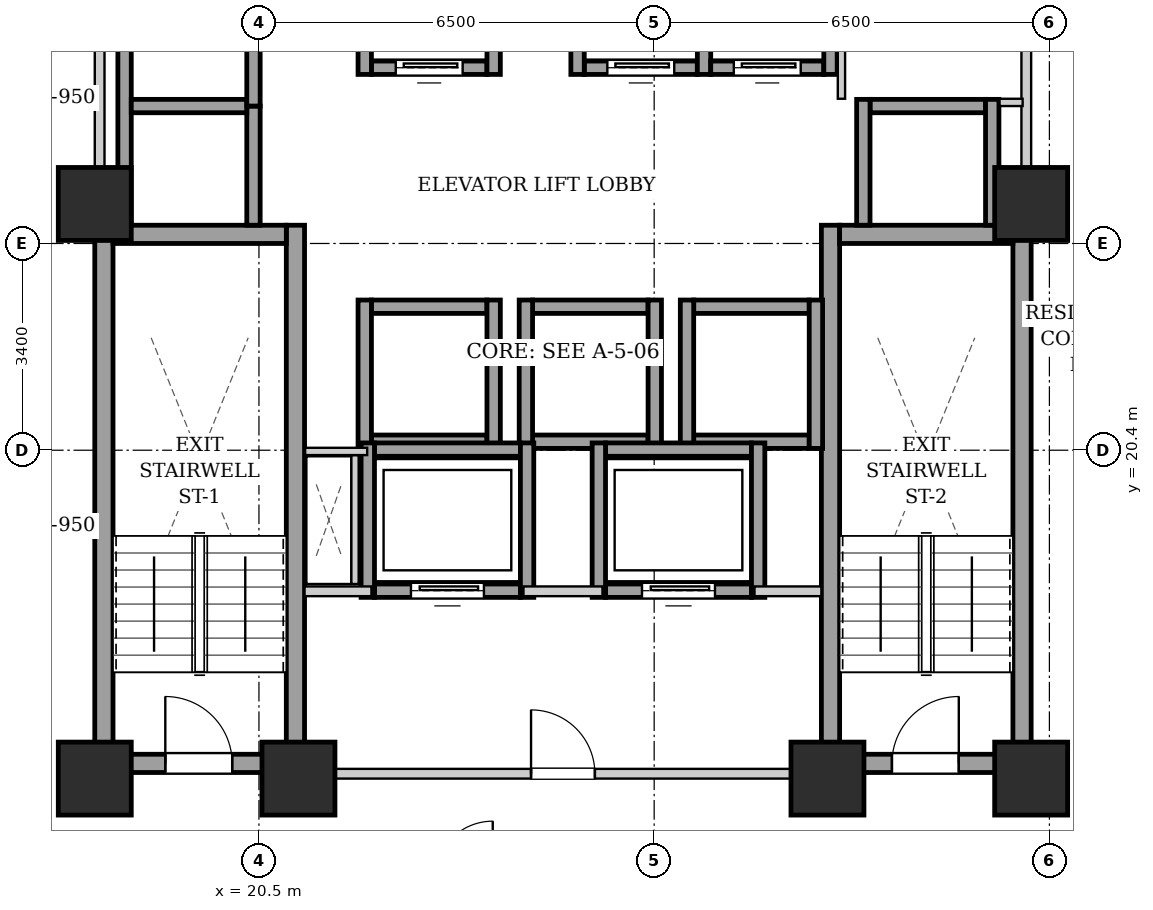
"""IFC4 building model, lengths in metres.
Left out: names, types, materials, properties, quantities, classifications, styles, units other than length and angle.
Written with IfcOpenShell. Run it as: python <this file> out.ifc"""

import sys

from ifc_helpers import new_model, si_unit, direction, frame, frame_2d, origin, origin_2d, place, context, subcontext, project, spatial, rectangle, extrude, element, fill, save


model = new_model("IFC4")
c1 = context("Model", 3, precision=1e-05, world=origin(), true_north=direction((0.0, 1.0)))
c2 = subcontext(c1, "Body", "Model", "MODEL_VIEW")
j1 = project(units=[si_unit("LENGTHUNIT", "METRE"), si_unit("PLANEANGLEUNIT", "RADIAN")], contexts=[c1])
p1 = place(None, origin())
s1 = spatial("IfcSite", under=j1, at=p1, CompositionType="ELEMENT")
p2 = place(p1, origin())
s2 = spatial("IfcBuilding", under=s1, at=p2, CompositionType="ELEMENT")
p3 = place(p2, frame((0.0, 0.0, 38.6)))
s3 = spatial("IfcBuildingStorey", under=s2, at=p3, CompositionType="ELEMENT", Elevation=38.6)
for number, where, z_axis, x_axis in (
    (1, (17.8, 15.0, 0.0), (0.0, 0.0, 1.0), (1.0, 0.0, 0.0)),
    (2, (21.15, 15.0, 0.0), (0.0, 0.0, 1.0), (1.0, 0.0, 0.0)),
    (3, (29.85, 15.0, 0.0), (0.0, 0.0, 1.0), (1.0, 0.0, 0.0)),
    (4, (33.2, 15.0, 0.0), (0.0, 0.0, 1.0), (1.0, 0.0, 0.0)),
    (5, (17.8, 24.45, 0.0), (0.0, 0.0, 1.0), (1.0, 0.0, 0.0)),
    (6, (33.2, 24.45, 0.0), (0.0, 0.0, 1.0), (1.0, 0.0, 0.0)),
):
    element("IfcColumn", number, at=place(p3, frame(where, z_axis=z_axis, x_axis=x_axis)), inside=s3, PredefinedType="COLUMN", context=c2, shape_type="SweptSolid", body=[
        extrude(rectangle(XDim=1.2, YDim=1.2, at=origin_2d()), origin(), (0.0, 0.0, 1.0), 3.2),
    ])
for number, where, z_axis, x_axis in (
    (7, (17.95, 15.1, 0.0), (0.0, 0.0, 1.0), (0.0, 1.0, 0.0)),
    (8, (21.1, 15.1, 0.0), (0.0, 0.0, 1.0), (0.0, 1.0, 0.0)),
):
    element("IfcWall", number, at=place(p3, frame(where, z_axis=z_axis, x_axis=x_axis)), inside=s3, PredefinedType="SHEAR", context=c2, shape_type="SweptSolid", body=[
        extrude(rectangle(XDim=9.0, YDim=0.3, at=frame_2d((4.5, 0.0))), origin(), (0.0, 0.0, 1.0), 2.94),
    ])
p4 = place(p3, frame((18.1, 23.95, 0.0), z_axis=(0.0, 0.0, 1.0), x_axis=(1.0, 0.0, 0.0)))
e9 = element("IfcWall", 9, at=p4, inside=s3, PredefinedType="SHEAR", context=c2, shape_type="SweptSolid", body=[
    extrude(rectangle(XDim=2.85, YDim=0.3, at=frame_2d((1.425, 0.0))), origin(), (0.0, 0.0, 1.0), 2.94),
])
p5 = place(p3, frame((18.1, 15.25, 0.0), z_axis=(0.0, 0.0, 1.0), x_axis=(1.0, 0.0, 0.0)))
e10 = element("IfcWall", 10, at=p5, inside=s3, PredefinedType="SHEAR", context=c2, shape_type="SweptSolid", body=[
    extrude(rectangle(XDim=2.85, YDim=0.3, at=frame_2d((1.425, 0.0))), origin(), (0.0, 0.0, 1.0), 2.94),
])
p6 = place(p5, frame((0.86, 0.0, 0.0)))
e11 = element("IfcOpeningElement", 11, at=p6, cuts=e10, PredefinedType="OPENING", context=c2, shape_type="SweptSolid", body=[
    extrude(rectangle(XDim=1.1, YDim=2.05, at=frame_2d((0.55, 1.025))), frame((0.0, 0.16, 0.0), z_axis=(0.0, -1.0, 0.0), x_axis=(1.0, 0.0, 0.0)), (0.0, 0.0, 1.0), 0.32),
])
for number, where, z_axis, x_axis in (
    (12, (29.9, 15.1, 0.0), (0.0, 0.0, 1.0), (0.0, 1.0, 0.0)),
    (13, (33.05, 15.1, 0.0), (0.0, 0.0, 1.0), (0.0, 1.0, 0.0)),
):
    element("IfcWall", number, at=place(p3, frame(where, z_axis=z_axis, x_axis=x_axis)), inside=s3, PredefinedType="SHEAR", context=c2, shape_type="SweptSolid", body=[
        extrude(rectangle(XDim=9.0, YDim=0.3, at=frame_2d((4.5, 0.0))), origin(), (0.0, 0.0, 1.0), 2.94),
    ])
p7 = place(p3, frame((30.05, 23.95, 0.0), z_axis=(0.0, 0.0, 1.0), x_axis=(1.0, 0.0, 0.0)))
e14 = element("IfcWall", 14, at=p7, inside=s3, PredefinedType="SHEAR", context=c2, shape_type="SweptSolid", body=[
    extrude(rectangle(XDim=2.85, YDim=0.3, at=frame_2d((1.425, 0.0))), origin(), (0.0, 0.0, 1.0), 2.94),
])
p8 = place(p3, frame((30.05, 15.25, 0.0), z_axis=(0.0, 0.0, 1.0), x_axis=(1.0, 0.0, 0.0)))
e15 = element("IfcWall", 15, at=p8, inside=s3, PredefinedType="SHEAR", context=c2, shape_type="SweptSolid", body=[
    extrude(rectangle(XDim=2.85, YDim=0.3, at=frame_2d((1.425, 0.0))), origin(), (0.0, 0.0, 1.0), 2.94),
])
p9 = place(p8, frame((0.86, 0.0, 0.0)))
e16 = element("IfcOpeningElement", 16, at=p9, cuts=e15, PredefinedType="OPENING", context=c2, shape_type="SweptSolid", body=[
    extrude(rectangle(XDim=1.1, YDim=2.05, at=frame_2d((0.55, 1.025))), frame((0.0, 0.16, 0.0), z_axis=(0.0, -1.0, 0.0), x_axis=(1.0, 0.0, 0.0)), (0.0, 0.0, 1.0), 0.32),
])
p10 = place(p3, frame((22.35, 26.69, 0.0), z_axis=(0.0, 0.0, 1.0), x_axis=(1.0, 0.0, 0.0)))
e17 = element("IfcWall", 17, at=p10, inside=s3, PredefinedType="SHEAR", context=c2, shape_type="SweptSolid", body=[
    extrude(rectangle(XDim=1.9, YDim=0.22, at=frame_2d((0.95, 0.0))), origin(), (0.0, 0.0, 1.0), 2.94),
])
p11 = place(p10, frame((0.4, 0.0, 0.0)))
e18 = element("IfcOpeningElement", 18, at=p11, cuts=e17, PredefinedType="OPENING", context=c2, shape_type="SweptSolid", body=[
    extrude(rectangle(XDim=1.1, YDim=2.15, at=frame_2d((0.55, 1.075))), frame((0.0, 0.12, 0.0), z_axis=(0.0, -1.0, 0.0), x_axis=(1.0, 0.0, 0.0)), (0.0, 0.0, 1.0), 0.24),
])
for number, where, z_axis, x_axis in (
    (19, (22.24, 26.58, 0.0), (0.0, 0.0, 1.0), (0.0, 1.0, 0.0)),
    (20, (24.36, 26.58, 0.0), (0.0, 0.0, 1.0), (0.0, 1.0, 0.0)),
):
    element("IfcWall", number, at=place(p3, frame(where, z_axis=z_axis, x_axis=x_axis)), inside=s3, PredefinedType="SHEAR", context=c2, shape_type="SweptSolid", body=[
        extrude(rectangle(XDim=2.44, YDim=0.22, at=frame_2d((1.22, 0.0))), origin(), (0.0, 0.0, 1.0), 2.94),
    ])
p12 = place(p3, frame((25.85, 26.69, 0.0), z_axis=(0.0, 0.0, 1.0), x_axis=(1.0, 0.0, 0.0)))
e21 = element("IfcWall", 21, at=p12, inside=s3, PredefinedType="SHEAR", context=c2, shape_type="SweptSolid", body=[
    extrude(rectangle(XDim=1.86, YDim=0.22, at=frame_2d((0.93, 0.0))), origin(), (0.0, 0.0, 1.0), 2.94),
])
p13 = place(p12, frame((0.38, 0.0, 0.0)))
e22 = element("IfcOpeningElement", 22, at=p13, cuts=e21, PredefinedType="OPENING", context=c2, shape_type="SweptSolid", body=[
    extrude(rectangle(XDim=1.1, YDim=2.15, at=frame_2d((0.55, 1.075))), frame((0.0, 0.12, 0.0), z_axis=(0.0, -1.0, 0.0), x_axis=(1.0, 0.0, 0.0)), (0.0, 0.0, 1.0), 0.24),
])
for number, where, z_axis, x_axis in (
    (23, (25.74, 26.58, 0.0), (0.0, 0.0, 1.0), (0.0, 1.0, 0.0)),
    (24, (27.82, 26.58, 0.0), (0.0, 0.0, 1.0), (0.0, 1.0, 0.0)),
):
    element("IfcWall", number, at=place(p3, frame(where, z_axis=z_axis, x_axis=x_axis)), inside=s3, PredefinedType="SHEAR", context=c2, shape_type="SweptSolid", body=[
        extrude(rectangle(XDim=2.44, YDim=0.22, at=frame_2d((1.22, 0.0))), origin(), (0.0, 0.0, 1.0), 2.94),
    ])
p14 = place(p3, frame((27.93, 26.69, 0.0), z_axis=(0.0, 0.0, 1.0), x_axis=(1.0, 0.0, 0.0)))
e25 = element("IfcWall", 25, at=p14, inside=s3, PredefinedType="SHEAR", context=c2, shape_type="SweptSolid", body=[
    extrude(rectangle(XDim=1.86, YDim=0.22, at=frame_2d((0.93, 0.0))), origin(), (0.0, 0.0, 1.0), 2.94),
])
p15 = place(p14, frame((0.38, 0.0, 0.0)))
e26 = element("IfcOpeningElement", 26, at=p15, cuts=e25, PredefinedType="OPENING", context=c2, shape_type="SweptSolid", body=[
    extrude(rectangle(XDim=1.1, YDim=2.15, at=frame_2d((0.55, 1.075))), frame((0.0, 0.12, 0.0), z_axis=(0.0, -1.0, 0.0), x_axis=(1.0, 0.0, 0.0)), (0.0, 0.0, 1.0), 0.24),
])
p16 = place(p3, frame((29.9, 26.58, 0.0), z_axis=(0.0, 0.0, 1.0), x_axis=(0.0, 1.0, 0.0)))
e27 = element("IfcWall", 27, at=p16, inside=s3, PredefinedType="SHEAR", context=c2, shape_type="SweptSolid", body=[
    extrude(rectangle(XDim=2.44, YDim=0.22, at=frame_2d((1.22, 0.0))), origin(), (0.0, 0.0, 1.0), 2.94),
])
for number, where, z_axis, x_axis in (
    (28, (22.35, 20.54, 0.0), (0.0, 0.0, 1.0), (1.0, 0.0, 0.0)),
    (29, (22.35, 22.76, 0.0), (0.0, 0.0, 1.0), (1.0, 0.0, 0.0)),
):
    element("IfcWall", number, at=place(p3, frame(where, z_axis=z_axis, x_axis=x_axis)), inside=s3, PredefinedType="SHEAR", context=c2, shape_type="SweptSolid", body=[
        extrude(rectangle(XDim=1.9, YDim=0.22, at=frame_2d((0.95, 0.0))), origin(), (0.0, 0.0, 1.0), 2.94),
    ])
for number, where, z_axis, x_axis in (
    (30, (22.24, 20.43, 0.0), (0.0, 0.0, 1.0), (0.0, 1.0, 0.0)),
    (31, (24.36, 20.43, 0.0), (0.0, 0.0, 1.0), (0.0, 1.0, 0.0)),
):
    element("IfcWall", number, at=place(p3, frame(where, z_axis=z_axis, x_axis=x_axis)), inside=s3, PredefinedType="SHEAR", context=c2, shape_type="SweptSolid", body=[
        extrude(rectangle(XDim=2.44, YDim=0.22, at=frame_2d((1.22, 0.0))), origin(), (0.0, 0.0, 1.0), 2.94),
    ])
for number, where, z_axis, x_axis in (
    (32, (25.0, 20.54, 0.0), (0.0, 0.0, 1.0), (1.0, 0.0, 0.0)),
    (33, (25.0, 22.76, 0.0), (0.0, 0.0, 1.0), (1.0, 0.0, 0.0)),
):
    element("IfcWall", number, at=place(p3, frame(where, z_axis=z_axis, x_axis=x_axis)), inside=s3, PredefinedType="SHEAR", context=c2, shape_type="SweptSolid", body=[
        extrude(rectangle(XDim=1.9, YDim=0.22, at=frame_2d((0.95, 0.0))), origin(), (0.0, 0.0, 1.0), 2.94),
    ])
for number, where, z_axis, x_axis in (
    (34, (24.89, 20.43, 0.0), (0.0, 0.0, 1.0), (0.0, 1.0, 0.0)),
    (35, (27.01, 20.43, 0.0), (0.0, 0.0, 1.0), (0.0, 1.0, 0.0)),
):
    element("IfcWall", number, at=place(p3, frame(where, z_axis=z_axis, x_axis=x_axis)), inside=s3, PredefinedType="SHEAR", context=c2, shape_type="SweptSolid", body=[
        extrude(rectangle(XDim=2.44, YDim=0.22, at=frame_2d((1.22, 0.0))), origin(), (0.0, 0.0, 1.0), 2.94),
    ])
for number, where, z_axis, x_axis in (
    (36, (27.65, 20.54, 0.0), (0.0, 0.0, 1.0), (1.0, 0.0, 0.0)),
    (37, (27.65, 22.76, 0.0), (0.0, 0.0, 1.0), (1.0, 0.0, 0.0)),
):
    element("IfcWall", number, at=place(p3, frame(where, z_axis=z_axis, x_axis=x_axis)), inside=s3, PredefinedType="SHEAR", context=c2, shape_type="SweptSolid", body=[
        extrude(rectangle(XDim=1.9, YDim=0.22, at=frame_2d((0.95, 0.0))), origin(), (0.0, 0.0, 1.0), 2.94),
    ])
for number, where, z_axis, x_axis in (
    (38, (27.54, 20.43, 0.0), (0.0, 0.0, 1.0), (0.0, 1.0, 0.0)),
    (39, (29.66, 20.43, 0.0), (0.0, 0.0, 1.0), (0.0, 1.0, 0.0)),
):
    element("IfcWall", number, at=place(p3, frame(where, z_axis=z_axis, x_axis=x_axis)), inside=s3, PredefinedType="SHEAR", context=c2, shape_type="SweptSolid", body=[
        extrude(rectangle(XDim=2.44, YDim=0.22, at=frame_2d((1.22, 0.0))), origin(), (0.0, 0.0, 1.0), 2.94),
    ])
p17 = place(p3, frame((18.29, 24.1, 0.0), z_axis=(0.0, 0.0, 1.0), x_axis=(0.0, 1.0, 0.0)))
e40 = element("IfcWall", 40, at=p17, inside=s3, PredefinedType="SHEAR", context=c2, shape_type="SweptSolid", body=[
    extrude(rectangle(XDim=4.14, YDim=0.22, at=frame_2d((2.07, 0.0))), origin(), (0.0, 0.0, 1.0), 2.94),
])
p18 = place(p3, frame((20.41, 24.1, 0.0), z_axis=(0.0, 0.0, 1.0), x_axis=(0.0, 1.0, 0.0)))
e41 = element("IfcWall", 41, at=p18, inside=s3, PredefinedType="SHEAR", context=c2, shape_type="SweptSolid", body=[
    extrude(rectangle(XDim=1.96, YDim=0.22, at=frame_2d((0.98, 0.0))), origin(), (0.0, 0.0, 1.0), 2.94),
])
p19 = place(p3, frame((18.4, 26.06, 0.0), z_axis=(0.0, 0.0, 1.0), x_axis=(1.0, 0.0, 0.0)))
e42 = element("IfcWall", 42, at=p19, inside=s3, PredefinedType="SHEAR", context=c2, shape_type="SweptSolid", body=[
    extrude(rectangle(XDim=1.9, YDim=0.22, at=frame_2d((0.95, 0.0))), origin(), (0.0, 0.0, 1.0), 2.94),
])
p20 = place(p3, frame((20.41, 26.06, 0.0), z_axis=(0.0, 0.0, 1.0), x_axis=(0.0, 1.0, 0.0)))
e43 = element("IfcWall", 43, at=p20, inside=s3, PredefinedType="SHEAR", context=c2, shape_type="SweptSolid", body=[
    extrude(rectangle(XDim=2.18, YDim=0.22, at=frame_2d((1.09, 0.0))), origin(), (0.0, 0.0, 1.0), 2.94),
])
p21 = place(p3, frame((30.55, 26.06, 0.0), z_axis=(0.0, 0.0, 1.0), x_axis=(1.0, 0.0, 0.0)))
e44 = element("IfcWall", 44, at=p21, inside=s3, PredefinedType="SHEAR", context=c2, shape_type="SweptSolid", body=[
    extrude(rectangle(XDim=1.9, YDim=0.22, at=frame_2d((0.95, 0.0))), origin(), (0.0, 0.0, 1.0), 2.94),
])
for number, where, z_axis, x_axis in (
    (45, (30.44, 24.1, 0.0), (0.0, 0.0, 1.0), (0.0, 1.0, 0.0)),
    (46, (32.56, 24.1, 0.0), (0.0, 0.0, 1.0), (0.0, 1.0, 0.0)),
):
    element("IfcWall", number, at=place(p3, frame(where, z_axis=z_axis, x_axis=x_axis)), inside=s3, PredefinedType="SHEAR", context=c2, shape_type="SweptSolid", body=[
        extrude(rectangle(XDim=2.07, YDim=0.22, at=frame_2d((1.035, 0.0))), origin(), (0.0, 0.0, 1.0), 2.94),
    ])
p22 = place(p3, frame((22.4, 18.09, 0.0), z_axis=(0.0, 0.0, 1.0), x_axis=(1.0, 0.0, 0.0)))
e47 = element("IfcWall", 47, at=p22, inside=s3, PredefinedType="SHEAR", context=c2, shape_type="SweptSolid", body=[
    extrude(rectangle(XDim=2.4, YDim=0.22, at=frame_2d((1.2, 0.0))), origin(), (0.0, 0.0, 1.0), 2.94),
])
p23 = place(p22, frame((0.6, 0.0, 0.0)))
e48 = element("IfcOpeningElement", 48, at=p23, cuts=e47, PredefinedType="OPENING", context=c2, shape_type="SweptSolid", body=[
    extrude(rectangle(XDim=1.2, YDim=2.15, at=frame_2d((0.6, 1.075))), frame((0.0, 0.12, 0.0), z_axis=(0.0, -1.0, 0.0), x_axis=(1.0, 0.0, 0.0)), (0.0, 0.0, 1.0), 0.24),
])
p24 = place(p3, frame((22.4, 20.41, 0.0), z_axis=(0.0, 0.0, 1.0), x_axis=(1.0, 0.0, 0.0)))
e49 = element("IfcWall", 49, at=p24, inside=s3, PredefinedType="SHEAR", context=c2, shape_type="SweptSolid", body=[
    extrude(rectangle(XDim=2.4, YDim=0.22, at=frame_2d((1.2, 0.0))), origin(), (0.0, 0.0, 1.0), 2.94),
])
for number, where, z_axis, x_axis in (
    (50, (22.29, 17.98, 0.0), (0.0, 0.0, 1.0), (0.0, 1.0, 0.0)),
    (51, (24.91, 17.98, 0.0), (0.0, 0.0, 1.0), (0.0, 1.0, 0.0)),
):
    element("IfcWall", number, at=place(p3, frame(where, z_axis=z_axis, x_axis=x_axis)), inside=s3, PredefinedType="SHEAR", context=c2, shape_type="SweptSolid", body=[
        extrude(rectangle(XDim=2.54, YDim=0.22, at=frame_2d((1.27, 0.0))), origin(), (0.0, 0.0, 1.0), 2.94),
    ])
p25 = place(p3, frame((26.2, 18.09, 0.0), z_axis=(0.0, 0.0, 1.0), x_axis=(1.0, 0.0, 0.0)))
e52 = element("IfcWall", 52, at=p25, inside=s3, PredefinedType="SHEAR", context=c2, shape_type="SweptSolid", body=[
    extrude(rectangle(XDim=2.4, YDim=0.22, at=frame_2d((1.2, 0.0))), origin(), (0.0, 0.0, 1.0), 2.94),
])
p26 = place(p25, frame((0.6, 0.0, 0.0)))
e53 = element("IfcOpeningElement", 53, at=p26, cuts=e52, PredefinedType="OPENING", context=c2, shape_type="SweptSolid", body=[
    extrude(rectangle(XDim=1.2, YDim=2.15, at=frame_2d((0.6, 1.075))), frame((0.0, 0.12, 0.0), z_axis=(0.0, -1.0, 0.0), x_axis=(1.0, 0.0, 0.0)), (0.0, 0.0, 1.0), 0.24),
])
p27 = place(p3, frame((26.2, 20.41, 0.0), z_axis=(0.0, 0.0, 1.0), x_axis=(1.0, 0.0, 0.0)))
e54 = element("IfcWall", 54, at=p27, inside=s3, PredefinedType="SHEAR", context=c2, shape_type="SweptSolid", body=[
    extrude(rectangle(XDim=2.4, YDim=0.22, at=frame_2d((1.2, 0.0))), origin(), (0.0, 0.0, 1.0), 2.94),
])
for number, where, z_axis, x_axis in (
    (55, (26.09, 17.98, 0.0), (0.0, 0.0, 1.0), (0.0, 1.0, 0.0)),
    (56, (28.71, 17.98, 0.0), (0.0, 0.0, 1.0), (0.0, 1.0, 0.0)),
):
    element("IfcWall", number, at=place(p3, frame(where, z_axis=z_axis, x_axis=x_axis)), inside=s3, PredefinedType="SHEAR", context=c2, shape_type="SweptSolid", body=[
        extrude(rectangle(XDim=2.54, YDim=0.22, at=frame_2d((1.27, 0.0))), origin(), (0.0, 0.0, 1.0), 2.94),
    ])
p28 = place(p3, frame((21.25, 15.08, 0.0), z_axis=(0.0, 0.0, 1.0), x_axis=(1.0, 0.0, 0.0)))
e57 = element("IfcWall", 57, at=p28, inside=s3, PredefinedType="PARTITIONING", context=c2, shape_type="SweptSolid", body=[
    extrude(rectangle(XDim=8.5, YDim=0.16, at=frame_2d((4.25, 0.0))), origin(), (0.0, 0.0, 1.0), 2.155),
])
p29 = place(p28, frame((3.725, 0.0, 0.0)))
e58 = element("IfcOpeningElement", 58, at=p29, cuts=e57, PredefinedType="OPENING", context=c2, shape_type="SweptSolid", body=[
    extrude(rectangle(XDim=1.05, YDim=2.05, at=frame_2d((0.525, 1.025))), frame((0.0, 0.09, 0.0), z_axis=(0.0, -1.0, 0.0), x_axis=(1.0, 0.0, 0.0)), (0.0, 0.0, 1.0), 0.18),
])
p30 = place(p3, frame((21.25, 18.08, 0.0), z_axis=(0.0, 0.0, 1.0), x_axis=(1.0, 0.0, 0.0)))
e59 = element("IfcWall", 59, at=p30, inside=s3, PredefinedType="PARTITIONING", context=c2, shape_type="SweptSolid", body=[
    extrude(rectangle(XDim=1.1, YDim=0.16, at=frame_2d((0.55, 0.0))), origin(), (0.0, 0.0, 1.0), 2.94),
])
p31 = place(p3, frame((24.85, 18.08, 0.0), z_axis=(0.0, 0.0, 1.0), x_axis=(1.0, 0.0, 0.0)))
e60 = element("IfcWall", 60, at=p31, inside=s3, PredefinedType="PARTITIONING", context=c2, shape_type="SweptSolid", body=[
    extrude(rectangle(XDim=1.3, YDim=0.16, at=frame_2d((0.65, 0.0))), origin(), (0.0, 0.0, 1.0), 2.94),
])
p32 = place(p3, frame((28.65, 18.08, 0.0), z_axis=(0.0, 0.0, 1.0), x_axis=(1.0, 0.0, 0.0)))
e61 = element("IfcWall", 61, at=p32, inside=s3, PredefinedType="PARTITIONING", context=c2, shape_type="SweptSolid", body=[
    extrude(rectangle(XDim=1.1, YDim=0.16, at=frame_2d((0.55, 0.0))), origin(), (0.0, 0.0, 1.0), 2.94),
])
for number, where, z_axis, x_axis in (
    (62, (17.88, 24.12, 0.0), (0.0, 0.0, 1.0), (0.0, 1.0, 0.0)),
    (63, (33.12, 24.12, 0.0), (0.0, 0.0, 1.0), (0.0, 1.0, 0.0)),
):
    element("IfcWall", number, at=place(p3, frame(where, z_axis=z_axis, x_axis=x_axis)), inside=s3, PredefinedType="PARTITIONING", context=c2, shape_type="SweptSolid", body=[
        extrude(rectangle(XDim=4.76, YDim=0.16, at=frame_2d((2.38, 0.0))), origin(), (0.0, 0.0, 1.0), 2.275),
    ])
p33 = place(p3, frame((22.08, 18.2, 0.0), z_axis=(0.0, 0.0, 1.0), x_axis=(0.0, 1.0, 0.0)))
e64 = element("IfcWall", 64, at=p33, inside=s3, PredefinedType="PARTITIONING", context=c2, shape_type="SweptSolid", body=[
    extrude(rectangle(XDim=2.12, YDim=0.12, at=frame_2d((1.06, 0.0))), origin(), (0.0, 0.0, 1.0), 2.94),
])
p34 = place(p3, frame((22.28, 20.38, 0.0), z_axis=(0.0, 0.0, 1.0), x_axis=(-1.0, 0.0, 0.0)))
e65 = element("IfcWall", 65, at=p34, inside=s3, PredefinedType="PARTITIONING", context=c2, shape_type="SweptSolid", body=[
    extrude(rectangle(XDim=1.02, YDim=0.12, at=frame_2d((0.51, 0.0))), origin(), (0.0, 0.0, 1.0), 2.94),
])
p35 = place(p3, frame((30.08, 26.18, 0.0), z_axis=(0.0, 0.0, 1.0), x_axis=(0.0, 1.0, 0.0)))
e66 = element("IfcWall", 66, at=p35, inside=s3, PredefinedType="PARTITIONING", context=c2, shape_type="SweptSolid", body=[
    extrude(rectangle(XDim=2.68, YDim=0.12, at=frame_2d((1.34, 0.0))), origin(), (0.0, 0.0, 1.0), 2.94),
])
p36 = place(p3, frame((32.68, 26.12, 0.0), z_axis=(0.0, 0.0, 1.0), x_axis=(1.0, 0.0, 0.0)))
e67 = element("IfcWall", 67, at=p36, inside=s3, PredefinedType="PARTITIONING", context=c2, shape_type="SweptSolid", body=[
    extrude(rectangle(XDim=0.38, YDim=0.12, at=frame_2d((0.19, 0.0))), origin(), (0.0, 0.0, 1.0), 2.94),
])
p37 = place(p6, origin())
e68 = element("IfcDoor", 68, at=p37, inside=s3, OperationType="SINGLE_SWING_LEFT", PredefinedType="DOOR", context=c2, shape_type="SweptSolid", body=[
    extrude(rectangle(XDim=1.1, YDim=2.05, at=frame_2d((0.55, 1.025))), frame((0.0, 0.025, 0.0), z_axis=(0.0, -1.0, 0.0), x_axis=(1.0, 0.0, 0.0)), (0.0, 0.0, 1.0), 0.05),
])
fill(e11, e68)
p38 = place(p9, origin())
e69 = element("IfcDoor", 69, at=p38, inside=s3, OperationType="SINGLE_SWING_RIGHT", PredefinedType="DOOR", context=c2, shape_type="SweptSolid", body=[
    extrude(rectangle(XDim=1.1, YDim=2.05, at=frame_2d((0.55, 1.025))), frame((0.0, 0.025, 0.0), z_axis=(0.0, -1.0, 0.0), x_axis=(1.0, 0.0, 0.0)), (0.0, 0.0, 1.0), 0.05),
])
fill(e16, e69)
p39 = place(p11, origin())
e70 = element("IfcDoor", 70, at=p39, inside=s3, OperationType="SLIDING_TO_LEFT", PredefinedType="DOOR", context=c2, shape_type="SweptSolid", body=[
    extrude(rectangle(XDim=1.1, YDim=2.15, at=frame_2d((0.55, 1.075))), frame((0.0, 0.025, 0.0), z_axis=(0.0, -1.0, 0.0), x_axis=(1.0, 0.0, 0.0)), (0.0, 0.0, 1.0), 0.05),
])
fill(e18, e70)
p40 = place(p13, origin())
e71 = element("IfcDoor", 71, at=p40, inside=s3, OperationType="SLIDING_TO_LEFT", PredefinedType="DOOR", context=c2, shape_type="SweptSolid", body=[
    extrude(rectangle(XDim=1.1, YDim=2.15, at=frame_2d((0.55, 1.075))), frame((0.0, 0.025, 0.0), z_axis=(0.0, -1.0, 0.0), x_axis=(1.0, 0.0, 0.0)), (0.0, 0.0, 1.0), 0.05),
])
fill(e22, e71)
p41 = place(p15, origin())
e72 = element("IfcDoor", 72, at=p41, inside=s3, OperationType="SLIDING_TO_LEFT", PredefinedType="DOOR", context=c2, shape_type="SweptSolid", body=[
    extrude(rectangle(XDim=1.1, YDim=2.15, at=frame_2d((0.55, 1.075))), frame((0.0, 0.025, 0.0), z_axis=(0.0, -1.0, 0.0), x_axis=(1.0, 0.0, 0.0)), (0.0, 0.0, 1.0), 0.05),
])
fill(e26, e72)
p42 = place(p23, origin())
e73 = element("IfcDoor", 73, at=p42, inside=s3, OperationType="SLIDING_TO_LEFT", PredefinedType="DOOR", context=c2, shape_type="SweptSolid", body=[
    extrude(rectangle(XDim=1.2, YDim=2.15, at=frame_2d((0.6, 1.075))), frame((0.0, 0.025, 0.0), z_axis=(0.0, -1.0, 0.0), x_axis=(1.0, 0.0, 0.0)), (0.0, 0.0, 1.0), 0.05),
])
fill(e48, e73)
p43 = place(p26, origin())
e74 = element("IfcDoor", 74, at=p43, inside=s3, OperationType="SLIDING_TO_LEFT", PredefinedType="DOOR", context=c2, shape_type="SweptSolid", body=[
    extrude(rectangle(XDim=1.2, YDim=2.15, at=frame_2d((0.6, 1.075))), frame((0.0, 0.025, 0.0), z_axis=(0.0, -1.0, 0.0), x_axis=(1.0, 0.0, 0.0)), (0.0, 0.0, 1.0), 0.05),
])
fill(e53, e74)
p44 = place(p29, origin())
e75 = element("IfcDoor", 75, at=p44, inside=s3, OperationType="SINGLE_SWING_LEFT", PredefinedType="DOOR", context=c2, shape_type="SweptSolid", body=[
    extrude(rectangle(XDim=1.05, YDim=2.05, at=frame_2d((0.525, 1.025))), frame((0.0, 0.025, 0.0), z_axis=(0.0, -1.0, 0.0), x_axis=(1.0, 0.0, 0.0)), (0.0, 0.0, 1.0), 0.05),
])
fill(e58, e75)
save(model, sys.argv[1])
